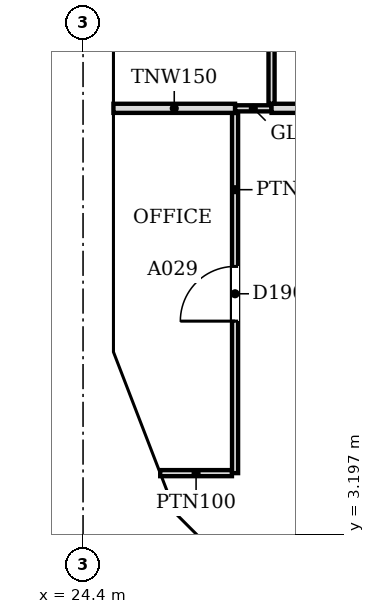
"""IFC4 building model, lengths in metres.
Left out: names, types, materials, properties, quantities, classifications, styles, units other than length and angle.
Written with IfcOpenShell. Run it as: python <this file> out.ifc"""

import sys

from ifc_helpers import new_model, si_unit, direction, frame, frame_2d, origin, place, context, subcontext, project, spatial, polyline, rectangle, outline, extrude, faceted_brep, source, transform, mapped, element, fill, save


model = new_model("IFC4")
c1 = context("Model", 3, precision=1e-05, world=origin(), true_north=direction((0.0, 1.0)))
c2 = subcontext(c1, "Body", "Model", "MODEL_VIEW")
j1 = project(units=[si_unit("LENGTHUNIT", "METRE"), si_unit("PLANEANGLEUNIT", "RADIAN")], contexts=[c1])
p1 = place(None, origin())
s1 = spatial("IfcSite", under=j1, at=p1, CompositionType="ELEMENT")
p2 = place(p1, origin())
s2 = spatial("IfcBuilding", under=s1, at=p2, CompositionType="ELEMENT")
p3 = place(p2, frame((0.0, 0.0, 52.4)))
s3 = spatial("IfcBuildingStorey", under=s2, at=p3, CompositionType="ELEMENT", Elevation=52.4)
m1 = source(origin(), c2, "Body", "Brep", [
    faceted_brep([(0.093, -0.25, 0.057), (3.143, -0.25, 3.8), (0.093, -0.25, 7.543), (0.0, 0.25, 7.544), (0.047, 0.25, 7.6), (3.143, 0.25, 3.8), (0.047, 0.25, 0.0), (0.0, 0.25, 0.056), (0.047, 0.0, 0.0), (0.047, 0.0, 7.6)], [[[0, 1, 2]], [[3, 4, 5, 6, 7]], [[6, 5, 1, 0, 8]], [[5, 4, 9, 2, 1]], [[4, 3, 9]], [[7, 6, 8]], [[7, 8, 0, 2, 9, 3]]]),
])
p4 = place(p3, frame((24.65, 12.293, -3.8), z_axis=(0.0, 0.0, 1.0), x_axis=(0.0, -1.0, 0.0)))
e1 = element("IfcWall", 1, at=p4, inside=s3, PredefinedType="SOLIDWALL", context=c2, shape_type="MappedRepresentation", body=[
    mapped(m1, transform((0.0, 0.0, 0.0), scale=1.0)),
])
m2 = source(origin(), c2, "Body", "SweptSolid", [
    extrude(outline(polyline([(0.247, 0.641), (2.821, 3.8), (0.247, 6.959), (0.247, 0.641)])), frame((0.0, 0.26, 0.0), z_axis=(0.0, -1.0, 0.0), x_axis=(1.0, 0.0, 0.0)), (0.0, 0.0, 1.0), 0.52),
])
p5 = place(p4, origin())
e2 = element("IfcOpeningElement", 2, at=p5, cuts=e1, PredefinedType="OPENING", context=c2, shape_type="MappedRepresentation", body=[
    mapped(m2, transform((0.0, 0.0, 0.0), scale=1.0)),
])
m3 = source(origin(), c2, "Body", "Brep", [
    faceted_brep([(3.003, -0.25, 0.0), (3.05, -0.25, 0.06), (3.05, -0.25, 7.54), (3.003, -0.25, 7.6), (0.0, -0.25, 3.8), (0.0, 0.25, 3.8), (2.957, 0.25, 7.541), (2.957, 0.25, 0.059), (3.003, 0.0, 0.0), (3.003, 0.0, 7.6)], [[[0, 1, 2, 3, 4]], [[5, 6, 7]], [[1, 0, 8]], [[9, 3, 2]], [[6, 5, 4, 3, 9]], [[5, 7, 8, 0, 4]], [[1, 8, 7, 6, 9, 2]]]),
])
p6 = place(p3, frame((24.65, 9.15, -3.8), z_axis=(0.0, 0.0, 1.0), x_axis=(0.0, -1.0, 0.0)))
e3 = element("IfcWall", 3, at=p6, inside=s3, PredefinedType="SOLIDWALL", context=c2, shape_type="MappedRepresentation", body=[
    mapped(m3, transform((0.0, 0.0, 0.0), scale=1.0)),
])
m4 = source(origin(), c2, "Body", "SweptSolid", [
    extrude(outline(polyline([(2.803, 6.944), (0.319, 3.8), (2.803, 0.656), (2.803, 6.944)])), frame((0.0, 0.26, 0.0), z_axis=(0.0, -1.0, 0.0), x_axis=(1.0, 0.0, 0.0)), (0.0, 0.0, 1.0), 0.52),
])
p7 = place(p6, origin())
e4 = element("IfcOpeningElement", 4, at=p7, cuts=e3, PredefinedType="OPENING", context=c2, shape_type="MappedRepresentation", body=[
    mapped(m4, transform((0.0, 0.0, 0.0), scale=1.0)),
])
m5 = source(origin(), c2, "Body", "Brep", [
    faceted_brep([(0.047, -0.25, 0.0), (2.997, -0.25, 3.8), (0.047, -0.25, 7.6), (0.0, -0.25, 7.541), (0.0, -0.25, 0.059), (0.093, 0.25, 7.54), (2.944, 0.25, 3.868), (2.944, 0.25, 3.732), (0.093, 0.25, 0.06), (2.997, 0.0, 3.8), (0.047, 0.0, 0.0), (0.047, 0.0, 7.6)], [[[0, 1, 2, 3, 4]], [[5, 6, 7, 8]], [[8, 7, 9, 1, 0, 10]], [[6, 5, 11, 2, 1, 9]], [[3, 2, 11]], [[10, 0, 4]], [[8, 10, 4, 3, 11, 5]], [[9, 7, 6]]]),
])
p8 = place(p3, frame((24.633, 6.19, -3.8), z_axis=(0.0, 0.0, 1.0), x_axis=(0.359901446078, -0.932990326376, 0.0)))
e5 = element("IfcWall", 5, at=p8, inside=s3, PredefinedType="SOLIDWALL", context=c2, shape_type="MappedRepresentation", body=[
    mapped(m5, transform((0.0, 0.0, 0.0), scale=1.0)),
])
m6 = source(origin(), c2, "Body", "SweptSolid", [
    extrude(outline(polyline([(0.247, 0.665), (2.681, 3.8), (0.247, 6.935), (0.247, 0.665)])), frame((0.0, 0.26, 0.0), z_axis=(0.0, -1.0, 0.0), x_axis=(1.0, 0.0, 0.0)), (0.0, 0.0, 1.0), 0.52),
])
p9 = place(p8, origin())
e6 = element("IfcOpeningElement", 6, at=p9, cuts=e5, PredefinedType="OPENING", context=c2, shape_type="MappedRepresentation", body=[
    mapped(m6, transform((0.0, 0.0, 0.0), scale=1.0)),
])
m7 = source(origin(), c2, "Body", "Brep", [
    faceted_brep([(2.944, -0.25, 0.0), (2.997, -0.25, 0.068), (2.997, -0.25, 7.532), (2.944, -0.25, 7.6), (0.0, -0.25, 3.8), (0.053, 0.25, 3.868), (2.891, 0.25, 7.532), (2.891, 0.25, 0.068), (0.053, 0.25, 3.731), (2.944, 0.0, 0.0), (2.944, 0.0, 7.6), (0.0, 0.0, 3.8)], [[[0, 1, 2, 3, 4]], [[5, 6, 7, 8]], [[1, 0, 9]], [[10, 3, 2]], [[6, 5, 11, 4, 3, 10]], [[8, 7, 9, 0, 4, 11]], [[8, 11, 5]], [[1, 9, 7, 6, 10, 2]]]),
])
p10 = place(p3, frame((25.712, 3.394, -3.8), z_axis=(0.0, 0.0, 1.0), x_axis=(0.707066050402, -0.707147509625, 0.0)))
e7 = element("IfcWall", 7, at=p10, inside=s3, PredefinedType="SOLIDWALL", context=c2, shape_type="MappedRepresentation", body=[
    mapped(m7, transform((0.0, 0.0, 0.0), scale=1.0)),
])
m8 = source(origin(), c2, "Body", "SweptSolid", [
    extrude(outline(polyline([(2.744, 6.934), (0.316, 3.8), (2.744, 0.666), (2.744, 6.934)])), frame((0.0, 0.26, 0.0), z_axis=(0.0, -1.0, 0.0), x_axis=(1.0, 0.0, 0.0)), (0.0, 0.0, 1.0), 0.52),
])
p11 = place(p10, origin())
e8 = element("IfcOpeningElement", 8, at=p11, cuts=e7, PredefinedType="OPENING", context=c2, shape_type="MappedRepresentation", body=[
    mapped(m8, transform((0.0, 0.0, 0.0), scale=1.0)),
])
p12 = place(p2, frame((0.0, 0.0, 56.2)))
s4 = spatial("IfcBuildingStorey", under=s2, at=p12, CompositionType="ELEMENT", Elevation=56.2)
m9 = source(origin(), c2, "Body", "Brep", [
    faceted_brep([(3.096, -0.25, 0.0), (6.1, -0.25, 3.8), (3.096, -0.25, 7.6), (0.047, -0.25, 3.857), (0.047, -0.25, 3.743), (0.0, 0.25, 3.8), (3.096, 0.25, 7.6), (6.053, 0.25, 3.859), (6.053, 0.25, 3.741), (3.096, 0.25, 0.0), (6.1, -0.0, 3.8), (0.0, 0.0, 3.8)], [[[0, 1, 2, 3, 4]], [[5, 6, 7, 8, 9]], [[9, 8, 10, 1, 0]], [[7, 6, 2, 1, 10]], [[6, 5, 11, 3, 2]], [[5, 9, 0, 4, 11]], [[11, 4, 3]], [[10, 8, 7]]]),
])
p13 = place(p12, frame((24.65, 12.247, -3.8), z_axis=(0.0, 0.0, 1.0), x_axis=(0.0, -1.0, 0.0)))
e9 = element("IfcWall", 9, at=p13, inside=s4, PredefinedType="SOLIDWALL", context=c2, shape_type="MappedRepresentation", body=[
    mapped(m9, transform((0.0, 0.0, 0.0), scale=1.0)),
])
m10 = source(origin(), c2, "Body", "SweptSolid", [
    extrude(outline(polyline([(3.094, 0.399), (5.781, 3.8), (3.094, 7.201), (0.323, 3.8), (3.094, 0.399)])), frame((0.0, 0.26, 0.0), z_axis=(0.0, -1.0, 0.0), x_axis=(1.0, 0.0, 0.0)), (0.0, 0.0, 1.0), 0.52),
])
p14 = place(p13, origin())
e10 = element("IfcOpeningElement", 10, at=p14, cuts=e9, PredefinedType="OPENING", context=c2, shape_type="MappedRepresentation", body=[
    mapped(m10, transform((0.0, 0.0, 0.0), scale=1.0)),
])
m11 = source(origin(), c2, "Body", "Brep", [
    faceted_brep([(2.95, -0.25, 0.0), (3.003, -0.25, 0.068), (3.003, -0.25, 7.532), (2.95, -0.25, 7.6), (0.0, -0.25, 3.8), (0.047, 0.25, 3.86), (2.898, 0.25, 7.532), (2.898, 0.25, 0.068), (0.047, 0.25, 3.74), (2.95, 0.0, 0.0), (2.95, 0.0, 7.6), (0.0, 0.0, 3.8)], [[[0, 1, 2, 3, 4]], [[5, 6, 7, 8]], [[1, 0, 9]], [[10, 3, 2]], [[6, 5, 11, 4, 3, 10]], [[8, 7, 9, 0, 4, 11]], [[8, 11, 5]], [[1, 9, 7, 6, 10, 2]]]),
])
p15 = place(p12, frame((24.65, 6.146, -3.8), z_axis=(0.0, 0.0, 1.0), x_axis=(0.359953949349, -0.932970071518, 0.0)))
e11 = element("IfcWall", 11, at=p15, inside=s4, PredefinedType="SOLIDWALL", context=c2, shape_type="MappedRepresentation", body=[
    mapped(m11, transform((0.0, 0.0, 0.0), scale=1.0)),
])
m12 = source(origin(), c2, "Body", "SweptSolid", [
    extrude(outline(polyline([(2.75, 6.935), (0.316, 3.8), (2.75, 0.665), (2.75, 6.935)])), frame((0.0, 0.26, 0.0), z_axis=(0.0, -1.0, 0.0), x_axis=(1.0, 0.0, 0.0)), (0.0, 0.0, 1.0), 0.52),
])
p16 = place(p15, origin())
e12 = element("IfcOpeningElement", 12, at=p16, cuts=e11, PredefinedType="OPENING", context=c2, shape_type="MappedRepresentation", body=[
    mapped(m12, transform((0.0, 0.0, 0.0), scale=1.0)),
])
m13 = source(origin(), c2, "Body", "Brep", [
    faceted_brep([(0.053, -0.25, 0.0), (2.997, -0.25, 3.8), (0.053, -0.25, 7.6), (0.0, -0.25, 7.532), (0.0, -0.25, 0.068), (0.106, 0.25, 7.532), (2.944, 0.25, 3.868), (2.944, 0.25, 3.732), (0.106, 0.25, 0.068), (2.997, 0.0, 3.8), (0.053, 0.0, 0.0), (0.053, 0.0, 7.6)], [[[0, 1, 2, 3, 4]], [[5, 6, 7, 8]], [[8, 7, 9, 1, 0, 10]], [[6, 5, 11, 2, 1, 9]], [[3, 2, 11]], [[10, 0, 4]], [[8, 10, 4, 3, 11, 5]], [[9, 7, 6]]]),
])
p17 = place(p12, frame((25.675, 3.431, -3.8), z_axis=(0.0, 0.0, 1.0), x_axis=(0.707106781187, -0.707106781187, 0.0)))
e13 = element("IfcWall", 13, at=p17, inside=s4, PredefinedType="SOLIDWALL", context=c2, shape_type="MappedRepresentation", body=[
    mapped(m13, transform((0.0, 0.0, 0.0), scale=1.0)),
])
m14 = source(origin(), c2, "Body", "SweptSolid", [
    extrude(outline(polyline([(0.253, 0.667), (2.681, 3.8), (0.253, 6.934), (0.253, 0.667)])), frame((0.0, 0.26, 0.0), z_axis=(0.0, -1.0, 0.0), x_axis=(1.0, 0.0, 0.0)), (0.0, 0.0, 1.0), 0.52),
])
p18 = place(p17, origin())
e14 = element("IfcOpeningElement", 14, at=p18, cuts=e13, PredefinedType="OPENING", context=c2, shape_type="MappedRepresentation", body=[
    mapped(m14, transform((0.0, 0.0, 0.0), scale=1.0)),
])
p19 = place(p3, frame((25.669, 4.2, 0.0), z_axis=(0.0, 0.0, 1.0), x_axis=(1.0, 0.0, 0.0)))
e15 = element("IfcWall", 15, at=p19, inside=s3, PredefinedType="PARTITIONING", context=c2, shape_type="SweptSolid", body=[
    extrude(rectangle(XDim=1.18, YDim=0.1, at=frame_2d((0.59, 0.0))), origin(), (0.0, 0.0, 1.0), 3.067),
])
p20 = place(p3, frame((26.9, 4.2, 0.0), z_axis=(0.0, 0.0, 1.0), x_axis=(0.0, 1.0, 0.0)))
e16 = element("IfcWall", 16, at=p20, inside=s3, PredefinedType="PARTITIONING", context=c2, shape_type="SweptSolid", body=[
    extrude(rectangle(XDim=5.924, YDim=0.1, at=frame_2d((2.962, 0.0))), origin(), (0.0, 0.0, 1.0), 3.067),
])
m15 = source(origin(), c2, "Body", "SweptSolid", [
    extrude(rectangle(XDim=0.9, YDim=2.1, at=frame_2d((0.45, 1.05))), frame((0.0, 0.06, 0.0), z_axis=(0.0, -1.0, 0.0), x_axis=(1.0, 0.0, 0.0)), (0.0, 0.0, 1.0), 0.12),
])
p21 = place(p20, frame((2.5, 0.0, 0.0)))
e17 = element("IfcOpeningElement", 17, at=p21, cuts=e16, PredefinedType="OPENING", context=c2, shape_type="MappedRepresentation", body=[
    mapped(m15, transform((0.0, 0.0, 0.0), scale=1.0)),
])
p22 = place(p3, frame((24.9, 10.2, 0.0), z_axis=(0.0, 0.0, 1.0), x_axis=(1.0, 0.0, 0.0)))
e18 = element("IfcWall", 18, at=p22, inside=s3, PredefinedType="PARTITIONING", context=c2, shape_type="SweptSolid", body=[
    extrude(rectangle(XDim=2.0, YDim=0.15, at=frame_2d((1.0, 0.0))), origin(), (0.0, 0.0, 1.0), 3.067),
])
p23 = place(p3, frame((26.901, 10.2, 0.0), z_axis=(0.0, 0.0, 1.0), x_axis=(1.0, 0.0, 0.0)))
e19 = element("IfcWall", 19, at=p23, inside=s3, PredefinedType="PARTITIONING", context=c2, shape_type="SweptSolid", body=[
    extrude(rectangle(XDim=0.598, YDim=0.1, at=frame_2d((0.299, 0.0))), origin(), (0.0, 0.0, 1.0), 3.067),
])
p24 = place(p3, frame((27.5, 10.2, 0.0), z_axis=(0.0, 0.0, 1.0), x_axis=(1.0, 0.0, 0.0)))
e20 = element("IfcWall", 20, at=p24, inside=s3, PredefinedType="PARTITIONING", context=c2, shape_type="SweptSolid", body=[
    extrude(rectangle(XDim=16.424, YDim=0.15, at=frame_2d((8.212, 0.0))), origin(), (0.0, 0.0, 1.0), 3.067),
])
p25 = place(p3, frame((27.5, 10.276, 0.0), z_axis=(0.0, 0.0, 1.0), x_axis=(0.0, 1.0, 0.0)))
e21 = element("IfcWall", 21, at=p25, inside=s3, PredefinedType="PARTITIONING", context=c2, shape_type="SweptSolid", body=[
    extrude(rectangle(XDim=8.448, YDim=0.1, at=frame_2d((4.224, 0.0))), origin(), (0.0, 0.0, 1.0), 3.067),
])
p26 = place(p25, frame((3.8, 0.0, 0.0)))
e22 = element("IfcOpeningElement", 22, at=p26, cuts=e21, PredefinedType="OPENING", context=c2, shape_type="MappedRepresentation", body=[
    mapped(m15, transform((0.0, 0.0, 0.0), scale=1.0)),
])
m16 = source(origin(), c2, "Body", "SweptSolid", [
    extrude(rectangle(XDim=0.9, YDim=2.1, at=frame_2d((0.45, 1.05))), frame((0.0, 0.025, 0.0), z_axis=(0.0, -1.0, 0.0), x_axis=(1.0, 0.0, 0.0)), (0.0, 0.0, 1.0), 0.05),
])
p27 = place(p21, origin())
e23 = element("IfcDoor", 23, at=p27, inside=s3, OperationType="SINGLE_SWING_LEFT", PredefinedType="DOOR", context=c2, shape_type="MappedRepresentation", body=[
    mapped(m16, transform((0.0, 0.0, 0.0), scale=1.0)),
])
fill(e17, e23)
save(model, sys.argv[1])
